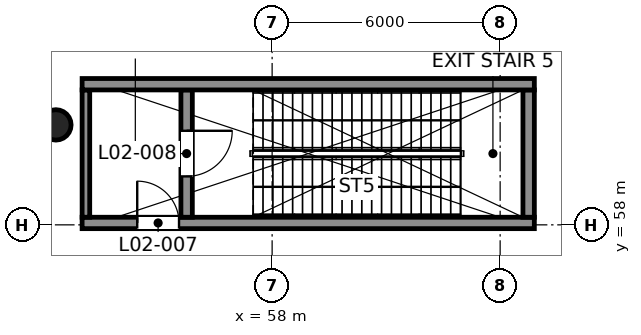
"""IFC4 building model, lengths in metres.
Left out: names, types, materials, properties, quantities, classifications, styles, units other than length and angle.
Written with IfcOpenShell. Run it as: python <this file> out.ifc"""

import sys

from ifc_helpers import new_model, si_unit, direction, frame, frame_2d, origin, origin_2d, place, context, subcontext, project, spatial, rectangle, circle, extrude, element, fill, save


model = new_model("IFC4")
c1 = context("Model", 3, precision=1e-05, world=origin(), true_north=direction((0.0, 1.0)))
c2 = subcontext(c1, "Body", "Model", "MODEL_VIEW")
j1 = project(units=[si_unit("LENGTHUNIT", "METRE"), si_unit("PLANEANGLEUNIT", "RADIAN")], contexts=[c1])
p1 = place(None, origin())
s1 = spatial("IfcSite", under=j1, at=p1, CompositionType="ELEMENT")
p2 = place(p1, origin())
s2 = spatial("IfcBuilding", under=s1, at=p2, CompositionType="ELEMENT")
p3 = place(p2, frame((0.0, 0.0, 15.0)))
s3 = spatial("IfcBuildingStorey", under=s2, at=p3, CompositionType="ELEMENT", Elevation=15.0)
p4 = place(p3, frame((52.31, 60.63, 0.0), z_axis=(0.0, 0.0, 1.0), x_axis=(1.0, 0.0, 0.0)))
e1 = element("IfcColumn", 1, at=p4, inside=s3, PredefinedType="COLUMN", context=c2, shape_type="SweptSolid", body=[
    extrude(circle(Radius=0.4, at=origin_2d()), origin(), (0.0, 0.0, 1.0), 8.0),
])
p5 = place(p3, frame((53.0, 58.05, 0.0), z_axis=(0.0, 0.0, 1.0), x_axis=(1.0, 0.0, 0.0)))
e2 = element("IfcWall", 2, at=p5, inside=s3, PredefinedType="SHEAR", context=c2, shape_type="SweptSolid", body=[
    extrude(rectangle(XDim=11.9, YDim=0.3, at=frame_2d((5.95, 0.0))), origin(), (0.0, 0.0, 1.0), 8.0),
])
p6 = place(p5, frame((1.45, 0.0, 0.0)))
e3 = element("IfcOpeningElement", 3, at=p6, cuts=e2, PredefinedType="OPENING", context=c2, shape_type="SweptSolid", body=[
    extrude(rectangle(XDim=1.1, YDim=2.1, at=frame_2d((0.55, 1.05))), frame((0.0, 0.16, 0.0), z_axis=(0.0, -1.0, 0.0), x_axis=(1.0, 0.0, 0.0)), (0.0, 0.0, 1.0), 0.32),
])
p7 = place(p3, frame((53.1, 58.2, 0.0), z_axis=(0.0, 0.0, 1.0), x_axis=(0.0, 1.0, 0.0)))
e4 = element("IfcWall", 4, at=p7, inside=s3, PredefinedType="SHEAR", context=c2, shape_type="SweptSolid", body=[
    extrude(rectangle(XDim=3.35, YDim=0.2, at=frame_2d((1.675, 0.0))), origin(), (0.0, 0.0, 1.0), 8.0),
])
p8 = place(p3, frame((55.75, 58.2, 0.0), z_axis=(0.0, 0.0, 1.0), x_axis=(0.0, 1.0, 0.0)))
e5 = element("IfcWall", 5, at=p8, inside=s3, PredefinedType="SHEAR", context=c2, shape_type="SweptSolid", body=[
    extrude(rectangle(XDim=3.35, YDim=0.3, at=frame_2d((1.675, 0.0))), origin(), (0.0, 0.0, 1.0), 8.0),
])
p9 = place(p8, frame((1.075, 0.0, 0.0)))
e6 = element("IfcOpeningElement", 6, at=p9, cuts=e5, PredefinedType="OPENING", context=c2, shape_type="SweptSolid", body=[
    extrude(rectangle(XDim=1.2, YDim=2.1, at=frame_2d((0.6, 1.05))), frame((0.0, 0.16, 0.0), z_axis=(0.0, -1.0, 0.0), x_axis=(1.0, 0.0, 0.0)), (0.0, 0.0, 1.0), 0.32),
])
p10 = place(p3, frame((64.75, 58.2, 0.0), z_axis=(0.0, 0.0, 1.0), x_axis=(0.0, 1.0, 0.0)))
e7 = element("IfcWall", 7, at=p10, inside=s3, PredefinedType="SHEAR", context=c2, shape_type="SweptSolid", body=[
    extrude(rectangle(XDim=3.35, YDim=0.3, at=frame_2d((1.675, 0.0))), origin(), (0.0, 0.0, 1.0), 8.0),
])
p11 = place(p3, frame((53.0, 61.7, 0.0), z_axis=(0.0, 0.0, 1.0), x_axis=(1.0, 0.0, 0.0)))
e8 = element("IfcWall", 8, at=p11, inside=s3, PredefinedType="SHEAR", context=c2, shape_type="SweptSolid", body=[
    extrude(rectangle(XDim=11.9, YDim=0.3, at=frame_2d((5.95, 0.0))), origin(), (0.0, 0.0, 1.0), 8.0),
])
p12 = place(p6, origin())
e9 = element("IfcDoor", 9, at=p12, inside=s3, OperationType="SINGLE_SWING_LEFT", PredefinedType="DOOR", context=c2, shape_type="SweptSolid", body=[
    extrude(rectangle(XDim=1.1, YDim=2.1, at=frame_2d((0.55, 1.05))), frame((0.0, 0.025, 0.0), z_axis=(0.0, -1.0, 0.0), x_axis=(1.0, 0.0, 0.0)), (0.0, 0.0, 1.0), 0.05),
])
fill(e3, e9)
p13 = place(p9, frame((1.2, 0.0, 0.0), z_axis=(0.0, 0.0, 1.0), x_axis=(-1.0, 0.0, 0.0)))
e10 = element("IfcDoor", 10, at=p13, inside=s3, OperationType="SINGLE_SWING_LEFT", PredefinedType="DOOR", context=c2, shape_type="SweptSolid", body=[
    extrude(rectangle(XDim=1.2, YDim=2.1, at=frame_2d((0.6, 1.05))), frame((0.0, 0.025, 0.0), z_axis=(0.0, -1.0, 0.0), x_axis=(1.0, 0.0, 0.0)), (0.0, 0.0, 1.0), 0.05),
])
fill(e6, e10)
save(model, sys.argv[1])
